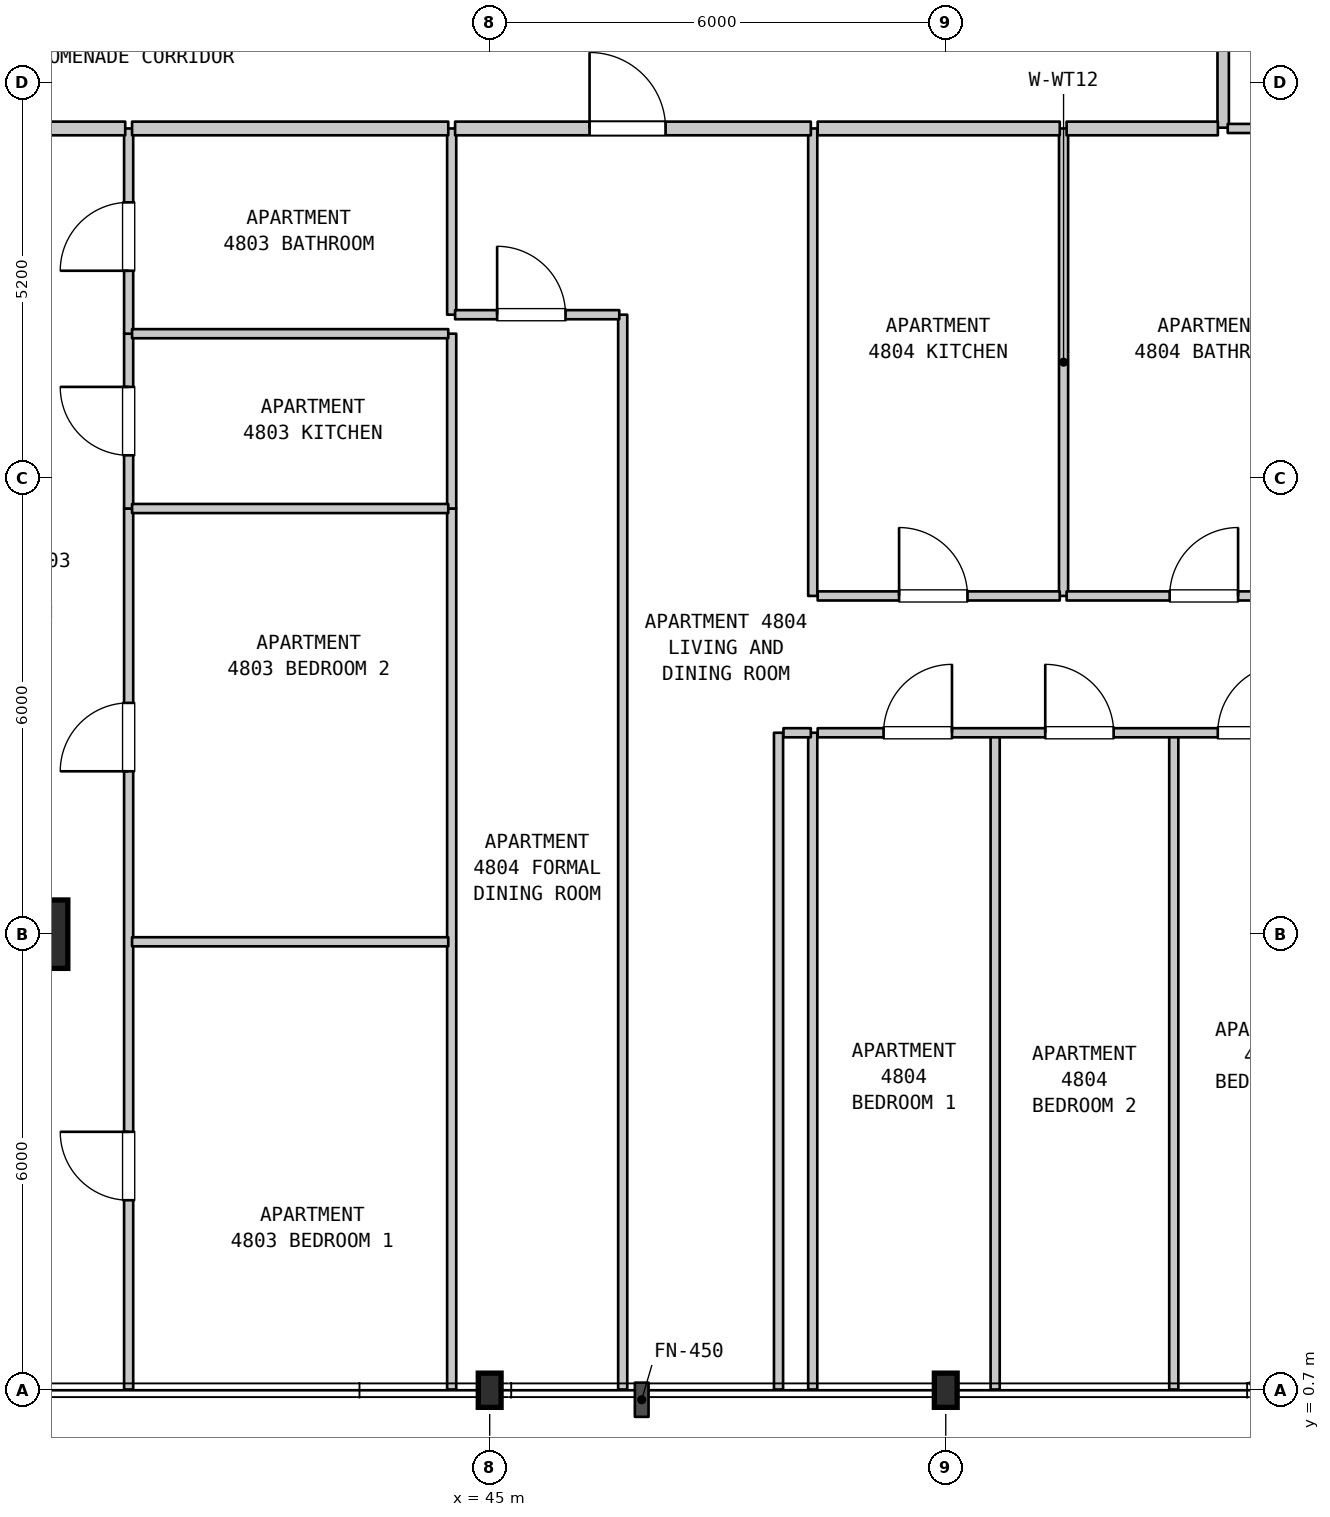
"""IFC4 building model, lengths in metres.
Left out: names, types, materials, properties, quantities, classifications, styles, units other than length and angle.
Written with IfcOpenShell. Run it as: python <this file> out.ifc"""

import sys

from ifc_helpers import new_model, si_unit, direction, frame, frame_2d, origin, origin_2d, place, context, subcontext, project, spatial, rectangle, i_section, extrude, element, fill, save


model = new_model("IFC4")
c1 = context("Model", 3, precision=1e-05, world=origin(), true_north=direction((0.0, 1.0)))
c2 = subcontext(c1, "Body", "Model", "MODEL_VIEW")
j1 = project(units=[si_unit("LENGTHUNIT", "METRE"), si_unit("PLANEANGLEUNIT", "RADIAN")], contexts=[c1])
p1 = place(None, origin())
s1 = spatial("IfcSite", under=j1, at=p1, CompositionType="ELEMENT")
p2 = place(p1, origin())
s2 = spatial("IfcBuilding", under=s1, at=p2, CompositionType="ELEMENT")
p3 = place(p2, frame((0.0, 0.0, 195.8)))
s3 = spatial("IfcBuildingStorey", under=s2, at=p3, CompositionType="ELEMENT", Elevation=195.8)
p4 = place(p3, frame((39.0, 6.7, 0.0), z_axis=(0.0, 0.0, 1.0), x_axis=(1.0, 0.0, 0.0)))
e1 = element("IfcColumn", 1, at=p4, inside=s3, PredefinedType="COLUMN", context=c2, shape_type="SweptSolid", body=[
    extrude(rectangle(XDim=0.9, YDim=0.9, at=origin_2d()), origin(), (0.0, 0.0, 1.0), 3.7),
])
for number, where, z_axis, x_axis in (
    (2, (45.0, 0.7, 0.0), (0.0, 0.0, 1.0), (1.0, 0.0, 0.0)),
    (3, (51.0, 0.7, 0.0), (0.0, 0.0, 1.0), (1.0, 0.0, 0.0)),
):
    element("IfcColumn", number, at=place(p3, frame(where, z_axis=z_axis, x_axis=x_axis)), inside=s3, PredefinedType="COLUMN", context=c2, shape_type="SweptSolid", body=[
        extrude(i_section(OverallWidth=0.3, OverallDepth=0.45, WebThickness=0.014, FlangeThickness=0.026, FilletRadius=0.027, at=origin_2d()), origin(), (0.0, 0.0, 1.0), 3.7),
    ])
p5 = place(p3, frame((40.25, 0.71, 0.0), z_axis=(0.0, 0.0, 1.0), x_axis=(0.0, 1.0, 0.0)))
e4 = element("IfcWall", 4, at=p5, inside=s3, PredefinedType="PARTITIONING", context=c2, shape_type="SweptSolid", body=[
    extrude(rectangle(XDim=11.59, YDim=0.12, at=frame_2d((5.795, 0.0))), origin(), (0.0, 0.0, 1.0), 3.39),
])
p6 = place(p5, frame((2.49, 0.0, 0.0)))
e5 = element("IfcOpeningElement", 5, at=p6, cuts=e4, PredefinedType="OPENING", context=c2, shape_type="SweptSolid", body=[
    extrude(rectangle(XDim=0.9, YDim=2.15, at=frame_2d((0.45, 1.075))), frame((0.0, 0.07, 0.0), z_axis=(0.0, -1.0, 0.0), x_axis=(1.0, 0.0, 0.0)), (0.0, 0.0, 1.0), 0.14),
])
p7 = place(p5, frame((8.133, 0.0, 0.0)))
e6 = element("IfcOpeningElement", 6, at=p7, cuts=e4, PredefinedType="OPENING", context=c2, shape_type="SweptSolid", body=[
    extrude(rectangle(XDim=0.9, YDim=2.15, at=frame_2d((0.45, 1.075))), frame((0.0, 0.07, 0.0), z_axis=(0.0, -1.0, 0.0), x_axis=(1.0, 0.0, 0.0)), (0.0, 0.0, 1.0), 0.14),
])
p8 = place(p3, frame((40.25, 12.3, 0.0), z_axis=(0.0, 0.0, 1.0), x_axis=(0.0, 1.0, 0.0)))
e7 = element("IfcWall", 7, at=p8, inside=s3, PredefinedType="PARTITIONING", context=c2, shape_type="SweptSolid", body=[
    extrude(rectangle(XDim=2.3, YDim=0.12, at=frame_2d((1.15, 0.0))), origin(), (0.0, 0.0, 1.0), 3.39),
])
p9 = place(p8, frame((0.7, 0.0, 0.0)))
e8 = element("IfcOpeningElement", 8, at=p9, cuts=e7, PredefinedType="OPENING", context=c2, shape_type="SweptSolid", body=[
    extrude(rectangle(XDim=0.9, YDim=2.15, at=frame_2d((0.45, 1.075))), frame((0.0, 0.07, 0.0), z_axis=(0.0, -1.0, 0.0), x_axis=(1.0, 0.0, 0.0)), (0.0, 0.0, 1.0), 0.14),
])
p10 = place(p3, frame((40.25, 14.6, 0.0), z_axis=(0.0, 0.0, 1.0), x_axis=(0.0, 1.0, 0.0)))
e9 = element("IfcWall", 9, at=p10, inside=s3, PredefinedType="PARTITIONING", context=c2, shape_type="SweptSolid", body=[
    extrude(rectangle(XDim=2.7, YDim=0.12, at=frame_2d((1.35, 0.0))), origin(), (0.0, 0.0, 1.0), 3.39),
])
p11 = place(p10, frame((0.828, 0.0, 0.0)))
e10 = element("IfcOpeningElement", 10, at=p11, cuts=e9, PredefinedType="OPENING", context=c2, shape_type="SweptSolid", body=[
    extrude(rectangle(XDim=0.9, YDim=2.1, at=frame_2d((0.45, 1.05))), frame((0.0, 0.07, 0.0), z_axis=(0.0, -1.0, 0.0), x_axis=(1.0, 0.0, 0.0)), (0.0, 0.0, 1.0), 0.14),
])
p12 = place(p3, frame((44.5, 0.71, 0.0), z_axis=(0.0, 0.0, 1.0), x_axis=(0.0, 1.0, 0.0)))
e11 = element("IfcWall", 11, at=p12, inside=s3, PredefinedType="PARTITIONING", context=c2, shape_type="SweptSolid", body=[
    extrude(rectangle(XDim=11.59, YDim=0.12, at=frame_2d((5.795, 0.0))), origin(), (0.0, 0.0, 1.0), 3.39),
])
p13 = place(p3, frame((44.5, 12.3, 0.0), z_axis=(0.0, 0.0, 1.0), x_axis=(0.0, 1.0, 0.0)))
e12 = element("IfcWall", 12, at=p13, inside=s3, PredefinedType="PARTITIONING", context=c2, shape_type="SweptSolid", body=[
    extrude(rectangle(XDim=2.3, YDim=0.12, at=frame_2d((1.15, 0.0))), origin(), (0.0, 0.0, 1.0), 3.39),
])
p14 = place(p3, frame((44.5, 14.85, 0.0), z_axis=(0.0, 0.0, 1.0), x_axis=(0.0, 1.0, 0.0)))
e13 = element("IfcWall", 13, at=p14, inside=s3, PredefinedType="PARTITIONING", context=c2, shape_type="SweptSolid", body=[
    extrude(rectangle(XDim=2.45, YDim=0.12, at=frame_2d((1.225, 0.0))), origin(), (0.0, 0.0, 1.0), 3.39),
])
p15 = place(p3, frame((46.75, 0.71, 0.0), z_axis=(0.0, 0.0, 1.0), x_axis=(0.0, 1.0, 0.0)))
e14 = element("IfcWall", 14, at=p15, inside=s3, PredefinedType="PARTITIONING", context=c2, shape_type="SweptSolid", body=[
    extrude(rectangle(XDim=14.14, YDim=0.12, at=frame_2d((7.07, 0.0))), origin(), (0.0, 0.0, 1.0), 3.39),
])
for number, where, z_axis, x_axis in (
    (15, (48.8, 0.71, 0.0), (0.0, 0.0, 1.0), (0.0, 1.0, 0.0)),
    (16, (49.25, 0.71, 0.0), (0.0, 0.0, 1.0), (0.0, 1.0, 0.0)),
):
    element("IfcWall", number, at=place(p3, frame(where, z_axis=z_axis, x_axis=x_axis)), inside=s3, PredefinedType="PARTITIONING", context=c2, shape_type="SweptSolid", body=[
        extrude(rectangle(XDim=8.64, YDim=0.12, at=frame_2d((4.32, 0.0))), origin(), (0.0, 0.0, 1.0), 3.39),
    ])
p16 = place(p3, frame((49.25, 11.15, 0.0), z_axis=(0.0, 0.0, 1.0), x_axis=(0.0, 1.0, 0.0)))
e17 = element("IfcWall", 17, at=p16, inside=s3, PredefinedType="PARTITIONING", context=c2, shape_type="SweptSolid", body=[
    extrude(rectangle(XDim=6.15, YDim=0.12, at=frame_2d((3.075, 0.0))), origin(), (0.0, 0.0, 1.0), 3.39),
])
p17 = place(p3, frame((51.65, 0.71, 0.0), z_axis=(0.0, 0.0, 1.0), x_axis=(0.0, 1.0, 0.0)))
e18 = element("IfcWall", 18, at=p17, inside=s3, PredefinedType="PARTITIONING", context=c2, shape_type="SweptSolid", body=[
    extrude(rectangle(XDim=8.64, YDim=0.12, at=frame_2d((4.32, 0.0))), origin(), (0.0, 0.0, 1.0), 3.39),
])
p18 = place(p3, frame((52.55, 11.15, 0.0), z_axis=(0.0, 0.0, 1.0), x_axis=(0.0, 1.0, 0.0)))
e19 = element("IfcWall", 19, at=p18, inside=s3, PredefinedType="PARTITIONING", context=c2, shape_type="SweptSolid", body=[
    extrude(rectangle(XDim=6.15, YDim=0.12, at=frame_2d((3.075, 0.0))), origin(), (0.0, 0.0, 1.0), 3.39),
])
p19 = place(p3, frame((54.0, 0.71, 0.0), z_axis=(0.0, 0.0, 1.0), x_axis=(0.0, 1.0, 0.0)))
e20 = element("IfcWall", 20, at=p19, inside=s3, PredefinedType="PARTITIONING", context=c2, shape_type="SweptSolid", body=[
    extrude(rectangle(XDim=8.64, YDim=0.12, at=frame_2d((4.32, 0.0))), origin(), (0.0, 0.0, 1.0), 3.39),
])
p20 = place(p3, frame((54.65, 17.31, 0.0), z_axis=(0.0, 0.0, 1.0), x_axis=(0.0, 1.0, 0.0)))
e21 = element("IfcWall", 21, at=p20, inside=s3, PredefinedType="STANDARD", context=c2, shape_type="SweptSolid", body=[
    extrude(rectangle(XDim=2.19, YDim=0.15, at=frame_2d((1.095, 0.0))), origin(), (0.0, 0.0, 1.0), 3.39),
])
p21 = place(p3, frame((40.295, 6.6, 0.0), z_axis=(0.0, 0.0, 1.0), x_axis=(1.0, 0.0, 0.0)))
e22 = element("IfcWall", 22, at=p21, inside=s3, PredefinedType="PARTITIONING", context=c2, shape_type="SweptSolid", body=[
    extrude(rectangle(XDim=4.16, YDim=0.12, at=frame_2d((2.08, 0.0))), origin(), (0.0, 0.0, 1.0), 2.79),
])
p22 = place(p3, frame((48.865, 9.35, 0.0), z_axis=(0.0, 0.0, 1.0), x_axis=(1.0, 0.0, 0.0)))
e23 = element("IfcWall", 23, at=p22, inside=s3, PredefinedType="PARTITIONING", context=c2, shape_type="SweptSolid", body=[
    extrude(rectangle(XDim=0.36, YDim=0.12, at=frame_2d((0.18, 0.0))), origin(), (0.0, 0.0, 1.0), 3.39),
])
p23 = place(p3, frame((49.315, 9.35, 0.0), z_axis=(0.0, 0.0, 1.0), x_axis=(1.0, 0.0, 0.0)))
e24 = element("IfcWall", 24, at=p23, inside=s3, PredefinedType="PARTITIONING", context=c2, shape_type="SweptSolid", body=[
    extrude(rectangle(XDim=7.675, YDim=0.12, at=frame_2d((3.837, 0.0))), origin(), (0.0, 0.0, 1.0), 3.39),
])
p24 = place(p23, frame((0.867, 0.0, 0.0)))
e25 = element("IfcOpeningElement", 25, at=p24, cuts=e24, PredefinedType="OPENING", context=c2, shape_type="SweptSolid", body=[
    extrude(rectangle(XDim=0.9, YDim=2.15, at=frame_2d((0.45, 1.075))), frame((0.0, 0.07, 0.0), z_axis=(0.0, -1.0, 0.0), x_axis=(1.0, 0.0, 0.0)), (0.0, 0.0, 1.0), 0.14),
])
p25 = place(p23, frame((2.994, 0.0, 0.0)))
e26 = element("IfcOpeningElement", 26, at=p25, cuts=e24, PredefinedType="OPENING", context=c2, shape_type="SweptSolid", body=[
    extrude(rectangle(XDim=0.9, YDim=2.15, at=frame_2d((0.45, 1.075))), frame((0.0, 0.07, 0.0), z_axis=(0.0, -1.0, 0.0), x_axis=(1.0, 0.0, 0.0)), (0.0, 0.0, 1.0), 0.14),
])
p26 = place(p23, frame((5.264, 0.0, 0.0)))
e27 = element("IfcOpeningElement", 27, at=p26, cuts=e24, PredefinedType="OPENING", context=c2, shape_type="SweptSolid", body=[
    extrude(rectangle(XDim=0.9, YDim=2.15, at=frame_2d((0.45, 1.075))), frame((0.0, 0.07, 0.0), z_axis=(0.0, -1.0, 0.0), x_axis=(1.0, 0.0, 0.0)), (0.0, 0.0, 1.0), 0.14),
])
p27 = place(p3, frame((49.315, 11.15, 0.0), z_axis=(0.0, 0.0, 1.0), x_axis=(1.0, 0.0, 0.0)))
e28 = element("IfcWall", 28, at=p27, inside=s3, PredefinedType="PARTITIONING", context=c2, shape_type="SweptSolid", body=[
    extrude(rectangle(XDim=3.185, YDim=0.12, at=frame_2d((1.593, 0.0))), origin(), (0.0, 0.0, 1.0), 3.39),
])
p28 = place(p27, frame((1.071, 0.0, 0.0)))
e29 = element("IfcOpeningElement", 29, at=p28, cuts=e28, PredefinedType="OPENING", context=c2, shape_type="SweptSolid", body=[
    extrude(rectangle(XDim=0.9, YDim=2.15, at=frame_2d((0.45, 1.075))), frame((0.0, 0.07, 0.0), z_axis=(0.0, -1.0, 0.0), x_axis=(1.0, 0.0, 0.0)), (0.0, 0.0, 1.0), 0.14),
])
p29 = place(p3, frame((52.59, 11.15, 0.0), z_axis=(0.0, 0.0, 1.0), x_axis=(1.0, 0.0, 0.0)))
e30 = element("IfcWall", 30, at=p29, inside=s3, PredefinedType="PARTITIONING", context=c2, shape_type="SweptSolid", body=[
    extrude(rectangle(XDim=3.755, YDim=0.12, at=frame_2d((1.877, 0.0))), origin(), (0.0, 0.0, 1.0), 3.39),
])
p30 = place(p29, frame((1.356, 0.0, 0.0)))
e31 = element("IfcOpeningElement", 31, at=p30, cuts=e30, PredefinedType="OPENING", context=c2, shape_type="SweptSolid", body=[
    extrude(rectangle(XDim=0.9, YDim=2.1, at=frame_2d((0.45, 1.05))), frame((0.0, 0.07, 0.0), z_axis=(0.0, -1.0, 0.0), x_axis=(1.0, 0.0, 0.0)), (0.0, 0.0, 1.0), 0.14),
])
for number, where, z_axis, x_axis in (
    (32, (40.295, 12.3, 0.0), (0.0, 0.0, 1.0), (1.0, 0.0, 0.0)),
    (33, (40.295, 14.6, 0.0), (0.0, 0.0, 1.0), (1.0, 0.0, 0.0)),
):
    element("IfcWall", number, at=place(p3, frame(where, z_axis=z_axis, x_axis=x_axis)), inside=s3, PredefinedType="PARTITIONING", context=c2, shape_type="SweptSolid", body=[
        extrude(rectangle(XDim=4.16, YDim=0.12, at=frame_2d((2.08, 0.0))), origin(), (0.0, 0.0, 1.0), 3.39),
    ])
p31 = place(p3, frame((44.545, 14.85, 0.0), z_axis=(0.0, 0.0, 1.0), x_axis=(1.0, 0.0, 0.0)))
e34 = element("IfcWall", 34, at=p31, inside=s3, PredefinedType="PARTITIONING", context=c2, shape_type="SweptSolid", body=[
    extrude(rectangle(XDim=2.16, YDim=0.12, at=frame_2d((1.08, 0.0))), origin(), (0.0, 0.0, 1.0), 3.39),
])
p32 = place(p31, frame((0.553, 0.0, 0.0)))
e35 = element("IfcOpeningElement", 35, at=p32, cuts=e34, PredefinedType="OPENING", context=c2, shape_type="SweptSolid", body=[
    extrude(rectangle(XDim=0.9, YDim=2.15, at=frame_2d((0.45, 1.075))), frame((0.0, 0.07, 0.0), z_axis=(0.0, -1.0, 0.0), x_axis=(1.0, 0.0, 0.0)), (0.0, 0.0, 1.0), 0.14),
])
p33 = place(p3, frame((36.695, 17.3, 0.0), z_axis=(0.0, 0.0, 1.0), x_axis=(1.0, 0.0, 0.0)))
e36 = element("IfcWall", 36, at=p33, inside=s3, PredefinedType="STANDARD", context=c2, shape_type="SweptSolid", body=[
    extrude(rectangle(XDim=3.51, YDim=0.18, at=frame_2d((1.755, 0.0))), origin(), (0.0, 0.0, 1.0), 3.39),
])
p34 = place(p33, frame((1.185, 0.0, 0.0)))
e37 = element("IfcOpeningElement", 37, at=p34, cuts=e36, PredefinedType="OPENING", context=c2, shape_type="SweptSolid", body=[
    extrude(rectangle(XDim=1.0, YDim=2.15, at=frame_2d((0.5, 1.075))), frame((0.0, 0.1, 0.0), z_axis=(0.0, -1.0, 0.0), x_axis=(1.0, 0.0, 0.0)), (0.0, 0.0, 1.0), 0.2),
])
p35 = place(p3, frame((40.295, 17.3, 0.0), z_axis=(0.0, 0.0, 1.0), x_axis=(1.0, 0.0, 0.0)))
e38 = element("IfcWall", 38, at=p35, inside=s3, PredefinedType="STANDARD", context=c2, shape_type="SweptSolid", body=[
    extrude(rectangle(XDim=4.16, YDim=0.18, at=frame_2d((2.08, 0.0))), origin(), (0.0, 0.0, 1.0), 3.39),
])
p36 = place(p3, frame((44.545, 17.3, 0.0), z_axis=(0.0, 0.0, 1.0), x_axis=(1.0, 0.0, 0.0)))
e39 = element("IfcWall", 39, at=p36, inside=s3, PredefinedType="STANDARD", context=c2, shape_type="SweptSolid", body=[
    extrude(rectangle(XDim=4.68, YDim=0.18, at=frame_2d((2.34, 0.0))), origin(), (0.0, 0.0, 1.0), 3.39),
])
p37 = place(p36, frame((1.769, 0.0, 0.0)))
e40 = element("IfcOpeningElement", 40, at=p37, cuts=e39, PredefinedType="OPENING", context=c2, shape_type="SweptSolid", body=[
    extrude(rectangle(XDim=1.0, YDim=2.15, at=frame_2d((0.5, 1.075))), frame((0.0, 0.1, 0.0), z_axis=(0.0, -1.0, 0.0), x_axis=(1.0, 0.0, 0.0)), (0.0, 0.0, 1.0), 0.2),
])
p38 = place(p3, frame((49.315, 17.3, 0.0), z_axis=(0.0, 0.0, 1.0), x_axis=(1.0, 0.0, 0.0)))
e41 = element("IfcWall", 41, at=p38, inside=s3, PredefinedType="STANDARD", context=c2, shape_type="SweptSolid", body=[
    extrude(rectangle(XDim=3.185, YDim=0.18, at=frame_2d((1.593, 0.0))), origin(), (0.0, 0.0, 1.0), 3.39),
])
p39 = place(p3, frame((52.59, 17.3, 0.0), z_axis=(0.0, 0.0, 1.0), x_axis=(1.0, 0.0, 0.0)))
e42 = element("IfcWall", 42, at=p39, inside=s3, PredefinedType="STANDARD", context=c2, shape_type="SweptSolid", body=[
    extrude(rectangle(XDim=1.99, YDim=0.18, at=frame_2d((0.995, 0.0))), origin(), (0.0, 0.0, 1.0), 3.39),
])
p40 = place(p3, frame((54.71, 17.3, 0.0), z_axis=(0.0, 0.0, 1.0), x_axis=(1.0, 0.0, 0.0)))
e43 = element("IfcWall", 43, at=p40, inside=s3, PredefinedType="PARTITIONING", context=c2, shape_type="SweptSolid", body=[
    extrude(rectangle(XDim=1.635, YDim=0.12, at=frame_2d((0.817, 0.0))), origin(), (0.0, 0.0, 1.0), 3.39),
])
p41 = place(p6, origin())
e44 = element("IfcDoor", 44, at=p41, inside=s3, OperationType="SINGLE_SWING_RIGHT", PredefinedType="DOOR", context=c2, shape_type="SweptSolid", body=[
    extrude(rectangle(XDim=0.9, YDim=2.15, at=frame_2d((0.45, 1.075))), frame((0.0, 0.025, 0.0), z_axis=(0.0, -1.0, 0.0), x_axis=(1.0, 0.0, 0.0)), (0.0, 0.0, 1.0), 0.05),
])
fill(e5, e44)
p42 = place(p7, origin())
e45 = element("IfcDoor", 45, at=p42, inside=s3, OperationType="SINGLE_SWING_LEFT", PredefinedType="DOOR", context=c2, shape_type="SweptSolid", body=[
    extrude(rectangle(XDim=0.9, YDim=2.15, at=frame_2d((0.45, 1.075))), frame((0.0, 0.025, 0.0), z_axis=(0.0, -1.0, 0.0), x_axis=(1.0, 0.0, 0.0)), (0.0, 0.0, 1.0), 0.05),
])
fill(e6, e45)
p43 = place(p9, origin())
e46 = element("IfcDoor", 46, at=p43, inside=s3, OperationType="SINGLE_SWING_RIGHT", PredefinedType="DOOR", context=c2, shape_type="SweptSolid", body=[
    extrude(rectangle(XDim=0.9, YDim=2.15, at=frame_2d((0.45, 1.075))), frame((0.0, 0.025, 0.0), z_axis=(0.0, -1.0, 0.0), x_axis=(1.0, 0.0, 0.0)), (0.0, 0.0, 1.0), 0.05),
])
fill(e8, e46)
p44 = place(p11, origin())
e47 = element("IfcDoor", 47, at=p44, inside=s3, OperationType="SINGLE_SWING_LEFT", PredefinedType="DOOR", context=c2, shape_type="SweptSolid", body=[
    extrude(rectangle(XDim=0.9, YDim=2.1, at=frame_2d((0.45, 1.05))), frame((0.0, 0.025, 0.0), z_axis=(0.0, -1.0, 0.0), x_axis=(1.0, 0.0, 0.0)), (0.0, 0.0, 1.0), 0.05),
])
fill(e10, e47)
p45 = place(p24, origin())
e48 = element("IfcDoor", 48, at=p45, inside=s3, OperationType="SINGLE_SWING_RIGHT", PredefinedType="DOOR", context=c2, shape_type="SweptSolid", body=[
    extrude(rectangle(XDim=0.9, YDim=2.15, at=frame_2d((0.45, 1.075))), frame((0.0, 0.025, 0.0), z_axis=(0.0, -1.0, 0.0), x_axis=(1.0, 0.0, 0.0)), (0.0, 0.0, 1.0), 0.05),
])
fill(e25, e48)
p46 = place(p25, origin())
e49 = element("IfcDoor", 49, at=p46, inside=s3, OperationType="SINGLE_SWING_LEFT", PredefinedType="DOOR", context=c2, shape_type="SweptSolid", body=[
    extrude(rectangle(XDim=0.9, YDim=2.15, at=frame_2d((0.45, 1.075))), frame((0.0, 0.025, 0.0), z_axis=(0.0, -1.0, 0.0), x_axis=(1.0, 0.0, 0.0)), (0.0, 0.0, 1.0), 0.05),
])
fill(e26, e49)
p47 = place(p26, origin())
e50 = element("IfcDoor", 50, at=p47, inside=s3, OperationType="SINGLE_SWING_RIGHT", PredefinedType="DOOR", context=c2, shape_type="SweptSolid", body=[
    extrude(rectangle(XDim=0.9, YDim=2.15, at=frame_2d((0.45, 1.075))), frame((0.0, 0.025, 0.0), z_axis=(0.0, -1.0, 0.0), x_axis=(1.0, 0.0, 0.0)), (0.0, 0.0, 1.0), 0.05),
])
fill(e27, e50)
p48 = place(p28, origin())
e51 = element("IfcDoor", 51, at=p48, inside=s3, OperationType="SINGLE_SWING_LEFT", PredefinedType="DOOR", context=c2, shape_type="SweptSolid", body=[
    extrude(rectangle(XDim=0.9, YDim=2.15, at=frame_2d((0.45, 1.075))), frame((0.0, 0.025, 0.0), z_axis=(0.0, -1.0, 0.0), x_axis=(1.0, 0.0, 0.0)), (0.0, 0.0, 1.0), 0.05),
])
fill(e29, e51)
p49 = place(p30, origin())
e52 = element("IfcDoor", 52, at=p49, inside=s3, OperationType="SINGLE_SWING_RIGHT", PredefinedType="DOOR", context=c2, shape_type="SweptSolid", body=[
    extrude(rectangle(XDim=0.9, YDim=2.1, at=frame_2d((0.45, 1.05))), frame((0.0, 0.025, 0.0), z_axis=(0.0, -1.0, 0.0), x_axis=(1.0, 0.0, 0.0)), (0.0, 0.0, 1.0), 0.05),
])
fill(e31, e52)
p50 = place(p32, origin())
e53 = element("IfcDoor", 53, at=p50, inside=s3, OperationType="SINGLE_SWING_LEFT", PredefinedType="DOOR", context=c2, shape_type="SweptSolid", body=[
    extrude(rectangle(XDim=0.9, YDim=2.15, at=frame_2d((0.45, 1.075))), frame((0.0, 0.025, 0.0), z_axis=(0.0, -1.0, 0.0), x_axis=(1.0, 0.0, 0.0)), (0.0, 0.0, 1.0), 0.05),
])
fill(e35, e53)
p51 = place(p37, origin())
e54 = element("IfcDoor", 54, at=p51, inside=s3, OperationType="SINGLE_SWING_LEFT", PredefinedType="DOOR", context=c2, shape_type="SweptSolid", body=[
    extrude(rectangle(XDim=1.0, YDim=2.15, at=frame_2d((0.5, 1.075))), frame((0.0, 0.025, 0.0), z_axis=(0.0, -1.0, 0.0), x_axis=(1.0, 0.0, 0.0)), (0.0, 0.0, 1.0), 0.05),
])
fill(e40, e54)
save(model, sys.argv[1])
